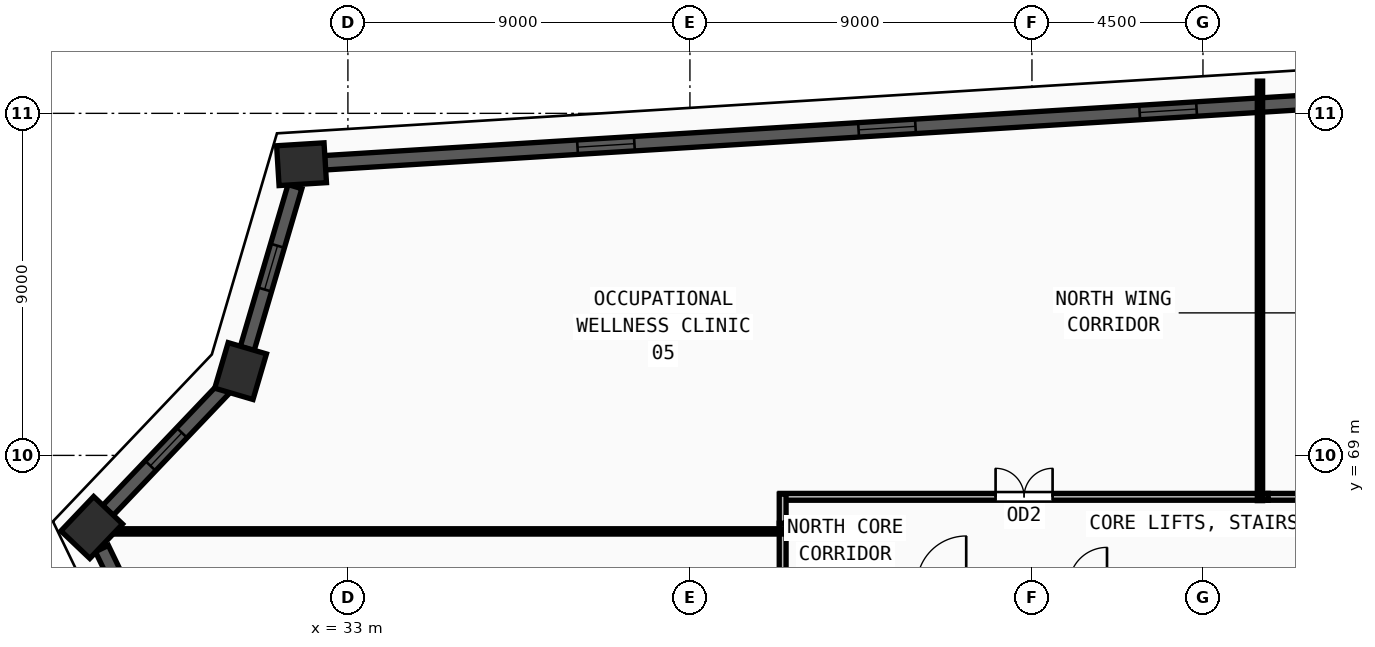
"""IFC4 building model, lengths in metres.
Left out: names, types, materials, properties, quantities, classifications, styles, units other than length and angle.
Written with IfcOpenShell. Run it as: python <this file> out.ifc"""

import sys

from ifc_helpers import new_model, si_unit, direction, frame, frame_2d, origin, origin_2d, place, context, subcontext, project, spatial, rectangle, extrude, source, transform, mapped, element, fill, save


model = new_model("IFC4")
c1 = context("Model", 3, precision=1e-05, world=origin(), true_north=direction((0.0, 1.0)))
c2 = subcontext(c1, "Body", "Model", "MODEL_VIEW")
j1 = project(units=[si_unit("LENGTHUNIT", "METRE"), si_unit("PLANEANGLEUNIT", "RADIAN")], contexts=[c1])
p1 = place(None, origin())
s1 = spatial("IfcSite", under=j1, at=p1, CompositionType="ELEMENT")
p2 = place(p1, origin())
s2 = spatial("IfcBuilding", under=s1, at=p2, CompositionType="ELEMENT")
p3 = place(p2, frame((0.0, 0.0, 201.75)))
s3 = spatial("IfcBuildingStorey", under=s2, at=p3, CompositionType="ELEMENT", Elevation=201.75)
m1 = source(origin(), c2, "Body", "SweptSolid", [
    extrude(rectangle(XDim=1.25, YDim=1.05, at=origin_2d()), origin(), (0.0, 0.0, 1.0), 3.75),
])
for number, where, z_axis, x_axis in (
    (1, (26.259, 67.103, 0.0), (0.0, 0.0, 1.0), (0.689, 0.724, 0.0)),
    (2, (30.176, 71.219, 0.0), (0.0, 0.0, 1.0), (0.283, 0.959, 0.0)),
    (3, (31.78, 76.662, 0.0), (0.0, 0.0, 1.0), (0.998, 0.062, 0.0)),
):
    element("IfcColumn", number, at=place(p3, frame(where, z_axis=z_axis, x_axis=x_axis)), inside=s3, PredefinedType="COLUMN", context=c2, shape_type="MappedRepresentation", body=[
        mapped(m1, transform((0.0, 0.0, 0.0), x_axis=(1.0, 0.0, 0.0), y_axis=(0.0, 1.0, 0.0), z_axis=(0.0, 0.0, 1.0), scale=1.0)),
    ])
p4 = place(p3, frame((61.979, 78.524, 0.0), z_axis=(0.0, 0.0, 1.0), x_axis=(-0.998104910724, -0.061535251593, 0.0)))
e4 = element("IfcWall", 4, at=p4, inside=s3, PredefinedType="SOLIDWALL", context=c2, shape_type="SweptSolid", body=[
    extrude(rectangle(XDim=29.641, YDim=0.38, at=frame_2d((14.821, 0.0))), origin(), (0.0, 0.0, 1.0), 3.57),
])
m2 = source(origin(), c2, "Body", "SweptSolid", [
    extrude(rectangle(XDim=1.5, YDim=1.9, at=frame_2d((0.75, 0.95))), frame((0.0, 0.2, 0.0), z_axis=(0.0, -1.0, 0.0), x_axis=(1.0, 0.0, 0.0)), (0.0, 0.0, 1.0), 0.4),
])
p5 = place(p4, frame((6.66, 0.0, 0.55)))
e5 = element("IfcOpeningElement", 5, at=p5, cuts=e4, PredefinedType="OPENING", context=c2, shape_type="MappedRepresentation", body=[
    mapped(m2, transform((0.0, 0.0, 0.0), x_axis=(1.0, 0.0, 0.0), y_axis=(0.0, 1.0, 0.0), z_axis=(0.0, 0.0, 1.0), scale=1.0)),
])
p6 = place(p4, frame((14.071, 0.0, 0.55)))
e6 = element("IfcOpeningElement", 6, at=p6, cuts=e4, PredefinedType="OPENING", context=c2, shape_type="MappedRepresentation", body=[
    mapped(m2, transform((0.0, 0.0, 0.0), x_axis=(1.0, 0.0, 0.0), y_axis=(0.0, 1.0, 0.0), z_axis=(0.0, 0.0, 1.0), scale=1.0)),
])
p7 = place(p4, frame((21.481, 0.0, 0.55)))
e7 = element("IfcOpeningElement", 7, at=p7, cuts=e4, PredefinedType="OPENING", context=c2, shape_type="MappedRepresentation", body=[
    mapped(m2, transform((0.0, 0.0, 0.0), x_axis=(1.0, 0.0, 0.0), y_axis=(0.0, 1.0, 0.0), z_axis=(0.0, 0.0, 1.0), scale=1.0)),
])
p8 = place(p3, frame((31.606, 76.072, 0.0), z_axis=(0.0, 0.0, 1.0), x_axis=(-0.282591614123, -0.959240313804, 0.0)))
e8 = element("IfcWall", 8, at=p8, inside=s3, PredefinedType="SOLIDWALL", context=c2, shape_type="SweptSolid", body=[
    extrude(rectangle(XDim=4.444, YDim=0.38, at=frame_2d((2.222, 0.0))), origin(), (0.0, 0.0, 1.0), 3.57),
])
m3 = source(origin(), c2, "Body", "SweptSolid", [
    extrude(rectangle(XDim=1.2, YDim=1.9, at=frame_2d((0.6, 0.95))), frame((0.0, 0.2, 0.0), z_axis=(0.0, -1.0, 0.0), x_axis=(1.0, 0.0, 0.0)), (0.0, 0.0, 1.0), 0.4),
])
p9 = place(p8, frame((1.622, 0.0, 0.55)))
e9 = element("IfcOpeningElement", 9, at=p9, cuts=e8, PredefinedType="OPENING", context=c2, shape_type="MappedRepresentation", body=[
    mapped(m3, transform((0.0, 0.0, 0.0), x_axis=(1.0, 0.0, 0.0), y_axis=(0.0, 1.0, 0.0), z_axis=(0.0, 0.0, 1.0), scale=1.0)),
])
p10 = place(p3, frame((29.752, 70.773, 0.0), z_axis=(0.0, 0.0, 1.0), x_axis=(-0.689477097778, -0.724307484181, 0.0)))
e10 = element("IfcWall", 10, at=p10, inside=s3, PredefinedType="SOLIDWALL", context=c2, shape_type="SweptSolid", body=[
    extrude(rectangle(XDim=4.451, YDim=0.38, at=frame_2d((2.226, 0.0))), origin(), (0.0, 0.0, 1.0), 3.57),
])
p11 = place(p10, frame((1.626, 0.0, 0.55)))
e11 = element("IfcOpeningElement", 11, at=p11, cuts=e10, PredefinedType="OPENING", context=c2, shape_type="MappedRepresentation", body=[
    mapped(m3, transform((0.0, 0.0, 0.0), x_axis=(1.0, 0.0, 0.0), y_axis=(0.0, 1.0, 0.0), z_axis=(0.0, 0.0, 1.0), scale=1.0)),
])
p12 = place(p3, frame((26.526, 66.549, 0.0), z_axis=(0.0, 0.0, 1.0), x_axis=(0.434865153575, -0.900495584779, 0.0)))
e12 = element("IfcWall", 12, at=p12, inside=s3, PredefinedType="SOLIDWALL", context=c2, shape_type="SweptSolid", body=[
    extrude(rectangle(XDim=24.465, YDim=0.38, at=frame_2d((12.233, 0.0))), origin(), (0.0, 0.0, 1.0), 3.57),
])
p13 = place(p12, frame((6.916, 0.0, 0.55)))
e13 = element("IfcOpeningElement", 13, at=p13, cuts=e12, PredefinedType="OPENING", context=c2, shape_type="MappedRepresentation", body=[
    mapped(m2, transform((0.0, 0.0, 0.0), x_axis=(1.0, 0.0, 0.0), y_axis=(0.0, 1.0, 0.0), z_axis=(0.0, 0.0, 1.0), scale=1.0)),
])
p14 = place(p12, frame((11.483, 0.0, 0.55)))
e14 = element("IfcOpeningElement", 14, at=p14, cuts=e12, PredefinedType="OPENING", context=c2, shape_type="MappedRepresentation", body=[
    mapped(m2, transform((0.0, 0.0, 0.0), x_axis=(1.0, 0.0, 0.0), y_axis=(0.0, 1.0, 0.0), z_axis=(0.0, 0.0, 1.0), scale=1.0)),
])
p15 = place(p3, frame((44.37, 67.91, 0.0), z_axis=(0.0, 0.0, 1.0), x_axis=(1.0, 0.0, 0.0)))
e15 = element("IfcWall", 15, at=p15, inside=s3, PredefinedType="PARTITIONING", context=c2, shape_type="SweptSolid", body=[
    extrude(rectangle(XDim=12.845, YDim=0.18, at=frame_2d((6.422, 0.0))), origin(), (0.0, 0.0, 1.0), 3.57),
])
m4 = source(origin(), c2, "Body", "SweptSolid", [
    extrude(rectangle(XDim=1.5, YDim=2.2, at=frame_2d((0.75, 1.1))), frame((0.0, 0.1, 0.0), z_axis=(0.0, -1.0, 0.0), x_axis=(1.0, 0.0, 0.0)), (0.0, 0.0, 1.0), 0.2),
])
p16 = place(p15, frame((5.673, 0.0, 0.0)))
e16 = element("IfcOpeningElement", 16, at=p16, cuts=e15, PredefinedType="OPENING", context=c2, shape_type="MappedRepresentation", body=[
    mapped(m4, transform((0.0, 0.0, 0.0), x_axis=(1.0, 0.0, 0.0), y_axis=(0.0, 1.0, 0.0), z_axis=(0.0, 0.0, 1.0), scale=1.0)),
])
p17 = place(p3, frame((44.44, 61.285, 0.0), z_axis=(0.0, 0.0, 1.0), x_axis=(0.0, 1.0, 0.0)))
e17 = element("IfcWall", 17, at=p17, inside=s3, PredefinedType="PARTITIONING", context=c2, shape_type="SweptSolid", body=[
    extrude(rectangle(XDim=5.93, YDim=0.18, at=frame_2d((2.965, 0.0))), origin(), (0.0, 0.0, 1.0), 3.57),
])
m5 = source(origin(), c2, "Body", "SweptSolid", [
    extrude(rectangle(XDim=1.0, YDim=2.2, at=frame_2d((0.5, 1.1))), frame((0.0, 0.1, 0.0), z_axis=(0.0, -1.0, 0.0), x_axis=(1.0, 0.0, 0.0)), (0.0, 0.0, 1.0), 0.2),
])
p18 = place(p17, frame((2.465, 0.0, 0.0)))
e18 = element("IfcOpeningElement", 18, at=p18, cuts=e17, PredefinedType="OPENING", context=c2, shape_type="MappedRepresentation", body=[
    mapped(m5, transform((0.0, 0.0, 0.0), x_axis=(1.0, 0.0, 0.0), y_axis=(0.0, 1.0, 0.0), z_axis=(0.0, 0.0, 1.0), scale=1.0)),
])
p19 = place(p3, frame((57.215, 67.91, 0.0), z_axis=(0.0, 0.0, 1.0), x_axis=(1.0, 0.0, 0.0)))
e19 = element("IfcWall", 19, at=p19, inside=s3, PredefinedType="PARTITIONING", context=c2, shape_type="SweptSolid", body=[
    extrude(rectangle(XDim=5.995, YDim=0.18, at=frame_2d((2.998, 0.0))), origin(), (0.0, 0.0, 1.0), 3.57),
])
p20 = place(p3, frame((44.44, 67.215, 0.0), z_axis=(0.0, 0.0, 1.0), x_axis=(0.0, 1.0, 0.0)))
e20 = element("IfcWall", 20, at=p20, inside=s3, PredefinedType="PARTITIONING", context=c2, shape_type="SweptSolid", body=[
    extrude(rectangle(XDim=0.765, YDim=0.18, at=frame_2d((0.382, 0.0))), origin(), (0.0, 0.0, 1.0), 3.57),
])
p21 = place(p3, frame((44.54, 67.0, 0.0), z_axis=(0.0, 0.0, 1.0), x_axis=(-1.0, 0.0, 0.0)))
e21 = element("IfcWall", 21, at=p21, inside=s3, PredefinedType="PARTITIONING", context=c2, shape_type="SweptSolid", body=[
    extrude(rectangle(XDim=18.931, YDim=0.14, at=frame_2d((9.466, 0.0))), origin(), (0.0, 0.0, 1.0), 2.855),
])
p22 = place(p3, frame((57.0, 67.81, 0.0), z_axis=(0.0, 0.0, 1.0), x_axis=(0.0, 1.0, 0.0)))
e22 = element("IfcWall", 22, at=p22, inside=s3, PredefinedType="PARTITIONING", context=c2, shape_type="SweptSolid", body=[
    extrude(rectangle(XDim=11.038, YDim=0.14, at=frame_2d((5.519, 0.0))), origin(), (0.0, 0.0, 1.0), 3.57),
])
m6 = source(origin(), c2, "Body", "SweptSolid", [
    extrude(rectangle(XDim=1.5, YDim=1.9, at=frame_2d((0.75, 0.95))), frame((0.0, 0.03, 0.0), z_axis=(0.0, -1.0, 0.0), x_axis=(1.0, 0.0, 0.0)), (0.0, 0.0, 1.0), 0.06),
])
p23 = place(p5, origin())
e23 = element("IfcWindow", 23, at=p23, inside=s3, PartitioningType="DOUBLE_PANEL_VERTICAL", PredefinedType="WINDOW", context=c2, shape_type="MappedRepresentation", body=[
    mapped(m6, transform((0.0, 0.0, 0.0), x_axis=(1.0, 0.0, 0.0), y_axis=(0.0, 1.0, 0.0), z_axis=(0.0, 0.0, 1.0), scale=1.0)),
])
fill(e5, e23)
p24 = place(p6, origin())
e24 = element("IfcWindow", 24, at=p24, inside=s3, PartitioningType="DOUBLE_PANEL_VERTICAL", PredefinedType="WINDOW", context=c2, shape_type="MappedRepresentation", body=[
    mapped(m6, transform((0.0, 0.0, 0.0), x_axis=(1.0, 0.0, 0.0), y_axis=(0.0, 1.0, 0.0), z_axis=(0.0, 0.0, 1.0), scale=1.0)),
])
fill(e6, e24)
p25 = place(p7, origin())
e25 = element("IfcWindow", 25, at=p25, inside=s3, PartitioningType="DOUBLE_PANEL_VERTICAL", PredefinedType="WINDOW", context=c2, shape_type="MappedRepresentation", body=[
    mapped(m6, transform((0.0, 0.0, 0.0), x_axis=(1.0, 0.0, 0.0), y_axis=(0.0, 1.0, 0.0), z_axis=(0.0, 0.0, 1.0), scale=1.0)),
])
fill(e7, e25)
m7 = source(origin(), c2, "Body", "SweptSolid", [
    extrude(rectangle(XDim=1.2, YDim=1.9, at=frame_2d((0.6, 0.95))), frame((0.0, 0.03, 0.0), z_axis=(0.0, -1.0, 0.0), x_axis=(1.0, 0.0, 0.0)), (0.0, 0.0, 1.0), 0.06),
])
p26 = place(p9, origin())
e26 = element("IfcWindow", 26, at=p26, inside=s3, PartitioningType="SINGLE_PANEL", PredefinedType="WINDOW", context=c2, shape_type="MappedRepresentation", body=[
    mapped(m7, transform((0.0, 0.0, 0.0), x_axis=(1.0, 0.0, 0.0), y_axis=(0.0, 1.0, 0.0), z_axis=(0.0, 0.0, 1.0), scale=1.0)),
])
fill(e9, e26)
p27 = place(p11, origin())
e27 = element("IfcWindow", 27, at=p27, inside=s3, PartitioningType="SINGLE_PANEL", PredefinedType="WINDOW", context=c2, shape_type="MappedRepresentation", body=[
    mapped(m7, transform((0.0, 0.0, 0.0), x_axis=(1.0, 0.0, 0.0), y_axis=(0.0, 1.0, 0.0), z_axis=(0.0, 0.0, 1.0), scale=1.0)),
])
fill(e11, e27)
m8 = source(origin(), c2, "Body", "SweptSolid", [
    extrude(rectangle(XDim=1.5, YDim=2.2, at=frame_2d((0.75, 1.1))), frame((0.0, 0.025, 0.0), z_axis=(0.0, -1.0, 0.0), x_axis=(1.0, 0.0, 0.0)), (0.0, 0.0, 1.0), 0.05),
])
p28 = place(p16, origin())
e28 = element("IfcDoor", 28, at=p28, inside=s3, OperationType="DOUBLE_DOOR_SINGLE_SWING", PredefinedType="DOOR", context=c2, shape_type="MappedRepresentation", body=[
    mapped(m8, transform((0.0, 0.0, 0.0), x_axis=(1.0, 0.0, 0.0), y_axis=(0.0, 1.0, 0.0), z_axis=(0.0, 0.0, 1.0), scale=1.0)),
])
fill(e16, e28)
save(model, sys.argv[1])
